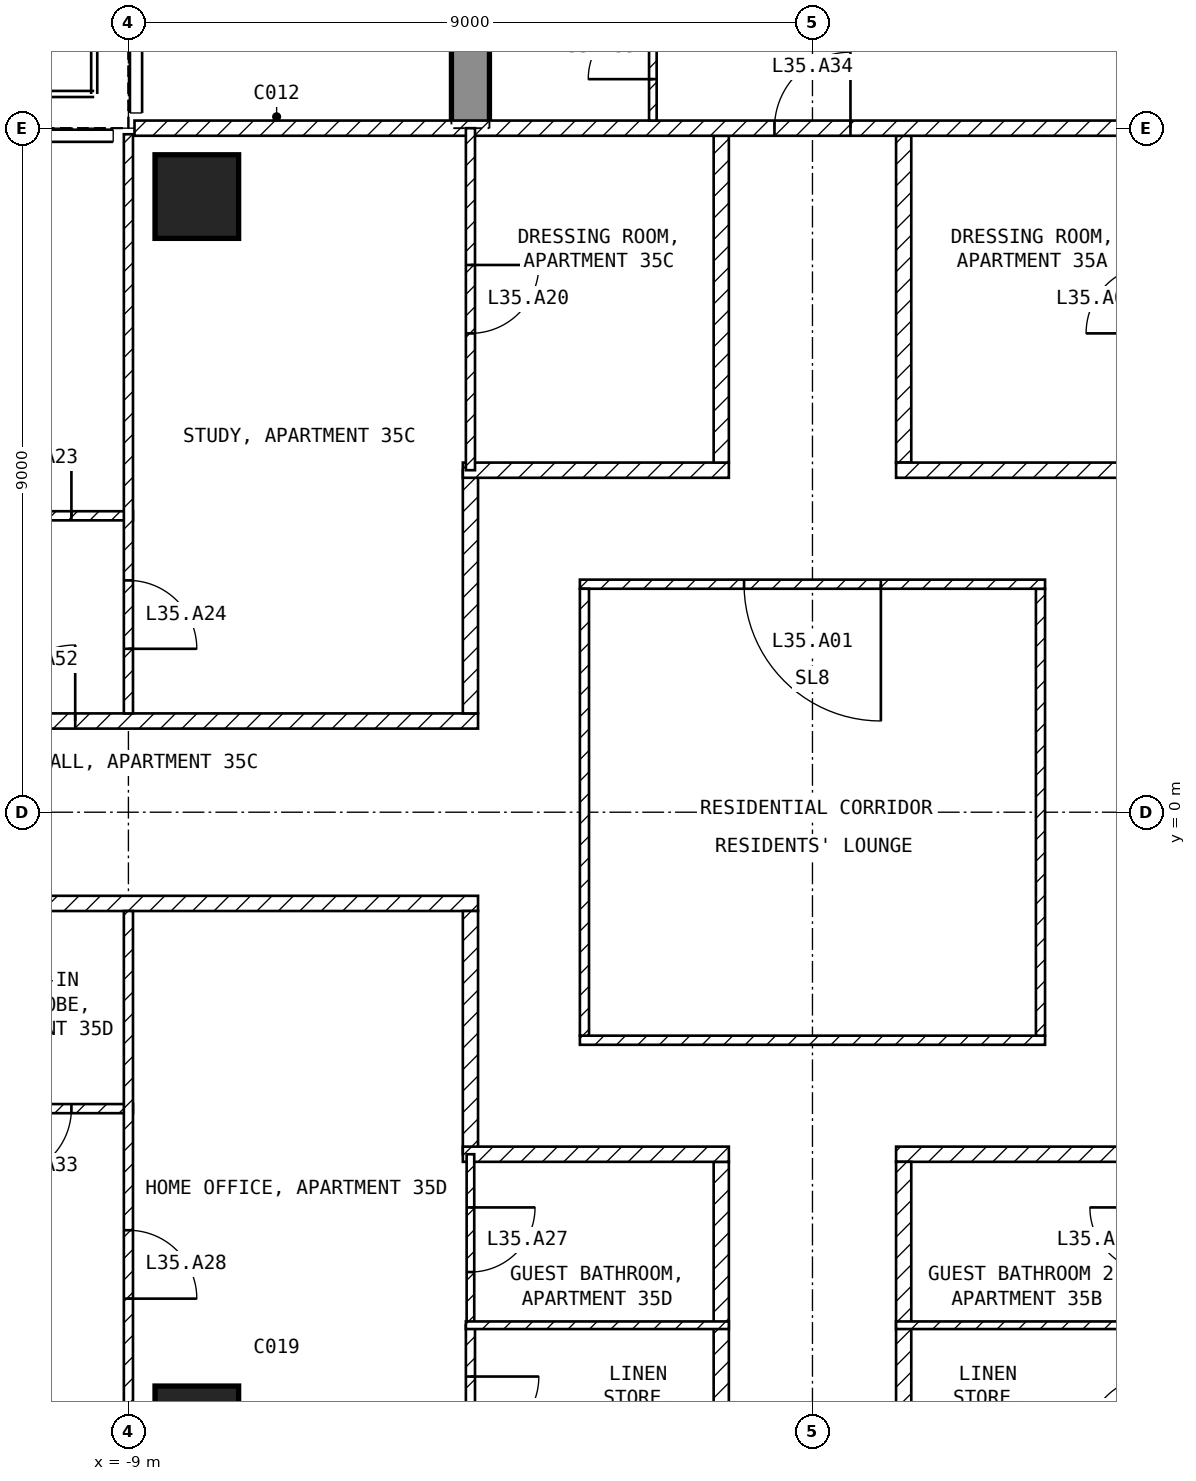
"""IFC4 building model, lengths in metres.
Left out: names, types, materials, properties, quantities, classifications, styles, units other than length and angle.
Written with IfcOpenShell. Run it as: python <this file> out.ifc"""

import sys

from ifc_helpers import new_model, si_unit, direction, frame, frame_2d, origin, origin_2d, place, context, subcontext, project, spatial, polyline, rectangle, outline, extrude, element, fill, save


model = new_model("IFC4")
c1 = context("Model", 3, precision=1e-05, world=origin(), true_north=direction((0.0, 1.0)))
c2 = subcontext(c1, "Body", "Model", "MODEL_VIEW")
j1 = project(units=[si_unit("LENGTHUNIT", "METRE"), si_unit("PLANEANGLEUNIT", "RADIAN")], contexts=[c1])
p1 = place(None, origin())
s1 = spatial("IfcSite", under=j1, at=p1, CompositionType="ELEMENT")
p2 = place(p1, origin())
s2 = spatial("IfcBuilding", under=s1, at=p2, CompositionType="ELEMENT")
p3 = place(p2, frame((0.0, 0.0, 144.4)))
s3 = spatial("IfcBuildingStorey", under=s2, at=p3, CompositionType="ELEMENT", Elevation=144.4)
for number, where, z_axis, x_axis in (
    (1, (-8.1, -8.1, -0.25), (0.0, 0.0, 1.0), (1.0, 0.0, 0.0)),
    (2, (-8.1, 8.1, -0.25), (0.0, 0.0, 1.0), (1.0, 0.0, 0.0)),
):
    element("IfcColumn", number, at=place(p3, frame(where, z_axis=z_axis, x_axis=x_axis)), inside=s3, PredefinedType="COLUMN", context=c2, shape_type="SweptSolid", body=[
        extrude(rectangle(XDim=1.1, YDim=1.1, at=origin_2d()), origin(), (0.0, 0.0, 1.0), 3.5),
    ])
p4 = place(p3, frame((-4.75, 9.0, -0.25), z_axis=(1.0, 0.0, 0.0), x_axis=(0.0, 1.0, 0.0)))
e3 = element("IfcWall", 3, at=p4, inside=s3, PredefinedType="SHEAR", context=c2, shape_type="SweptSolid", body=[
    extrude(outline(polyline([(0.0, 0.0), (2.1, 0.0), (2.1, 2.65), (4.5, 2.65), (4.5, 0.0), (9.9, 0.0), (9.9, 2.65), (12.3, 2.65), (12.3, 0.0), (16.55, 0.0), (16.55, 3.5), (0.0, 3.5), (0.0, 0.0)])), origin(), (0.0, 0.0, 1.0), 0.5),
])
p5 = place(p3, frame((-3.06, -3.0, 0.0), z_axis=(0.0, 0.0, 1.0), x_axis=(1.0, 0.0, 0.0)))
e4 = element("IfcWall", 4, at=p5, inside=s3, PredefinedType="PARTITIONING", context=c2, shape_type="SweptSolid", body=[
    extrude(rectangle(XDim=6.12, YDim=0.12, at=frame_2d((3.06, 0.0))), origin(), (0.0, 0.0, 1.0), 3.25),
])
p6 = place(p3, frame((3.0, -2.94, 0.0), z_axis=(0.0, 0.0, 1.0), x_axis=(0.0, 1.0, 0.0)))
e5 = element("IfcWall", 5, at=p6, inside=s3, PredefinedType="PARTITIONING", context=c2, shape_type="SweptSolid", body=[
    extrude(rectangle(XDim=5.88, YDim=0.12, at=frame_2d((2.94, 0.0))), origin(), (0.0, 0.0, 1.0), 3.25),
])
p7 = place(p3, frame((3.06, 3.0, 0.0), z_axis=(0.0, 0.0, 1.0), x_axis=(-1.0, 0.0, 0.0)))
e6 = element("IfcWall", 6, at=p7, inside=s3, PredefinedType="PARTITIONING", context=c2, shape_type="SweptSolid", body=[
    extrude(rectangle(XDim=6.12, YDim=0.12, at=frame_2d((3.06, 0.0))), origin(), (0.0, 0.0, 1.0), 3.25),
])
p8 = place(p7, frame((2.16, 0.0, 0.0)))
e7 = element("IfcOpeningElement", 7, at=p8, cuts=e6, PredefinedType="OPENING", context=c2, shape_type="SweptSolid", body=[
    extrude(rectangle(XDim=1.8, YDim=2.1, at=frame_2d((0.9, 1.05))), frame((0.0, 0.07, 0.0), z_axis=(0.0, -1.0, 0.0), x_axis=(1.0, 0.0, 0.0)), (0.0, 0.0, 1.0), 0.14),
])
p9 = place(p3, frame((-3.0, 2.94, 0.0), z_axis=(0.0, 0.0, 1.0), x_axis=(0.0, -1.0, 0.0)))
e8 = element("IfcWall", 8, at=p9, inside=s3, PredefinedType="PARTITIONING", context=c2, shape_type="SweptSolid", body=[
    extrude(rectangle(XDim=5.88, YDim=0.12, at=frame_2d((2.94, 0.0))), origin(), (0.0, 0.0, 1.0), 3.25),
])
p10 = place(p3, frame((1.2, 8.9, 0.0), z_axis=(0.0, 0.0, 1.0), x_axis=(0.0, -1.0, 0.0)))
e9 = element("IfcWall", 9, at=p10, inside=s3, PredefinedType="PARTITIONING", context=c2, shape_type="SweptSolid", body=[
    extrude(rectangle(XDim=4.3, YDim=0.2, at=frame_2d((2.15, 0.0))), origin(), (0.0, 0.0, 1.0), 3.25),
])
for number, where, z_axis, x_axis in (
    (10, (1.1, 4.5, 0.0), (0.0, 0.0, 1.0), (1.0, 0.0, 0.0)),
    (11, (4.6, -4.5, 0.0), (0.0, 0.0, 1.0), (-1.0, 0.0, 0.0)),
):
    element("IfcWall", number, at=place(p3, frame(where, z_axis=z_axis, x_axis=x_axis)), inside=s3, PredefinedType="PARTITIONING", context=c2, shape_type="SweptSolid", body=[
        extrude(rectangle(XDim=3.5, YDim=0.2, at=frame_2d((1.75, 0.0))), origin(), (0.0, 0.0, 1.0), 3.25),
    ])
p11 = place(p3, frame((1.2, -4.6, 0.0), z_axis=(0.0, 0.0, 1.0), x_axis=(0.0, -1.0, 0.0)))
e12 = element("IfcWall", 12, at=p11, inside=s3, PredefinedType="PARTITIONING", context=c2, shape_type="SweptSolid", body=[
    extrude(rectangle(XDim=4.3, YDim=0.2, at=frame_2d((2.15, 0.0))), origin(), (0.0, 0.0, 1.0), 3.25),
])
p12 = place(p3, frame((-21.6, 1.2, 0.0), z_axis=(0.0, 0.0, 1.0), x_axis=(1.0, 0.0, 0.0)))
e13 = element("IfcWall", 13, at=p12, inside=s3, PredefinedType="PARTITIONING", context=c2, shape_type="SweptSolid", body=[
    extrude(rectangle(XDim=17.2, YDim=0.2, at=frame_2d((8.6, 0.0))), origin(), (0.0, 0.0, 1.0), 3.25),
])
p13 = place(p12, frame((10.9, 0.0, 0.0)))
e14 = element("IfcOpeningElement", 14, at=p13, cuts=e13, PredefinedType="OPENING", context=c2, shape_type="SweptSolid", body=[
    extrude(rectangle(XDim=1.0, YDim=2.1, at=frame_2d((0.5, 1.05))), frame((0.0, 0.11, 0.0), z_axis=(0.0, -1.0, 0.0), x_axis=(1.0, 0.0, 0.0)), (0.0, 0.0, 1.0), 0.22),
])
p14 = place(p3, frame((-4.5, 1.3, 0.0), z_axis=(0.0, 0.0, 1.0), x_axis=(0.0, 1.0, 0.0)))
e15 = element("IfcWall", 15, at=p14, inside=s3, PredefinedType="PARTITIONING", context=c2, shape_type="SweptSolid", body=[
    extrude(rectangle(XDim=3.2, YDim=0.2, at=frame_2d((1.6, 0.0))), origin(), (0.0, 0.0, 1.0), 3.25),
])
p15 = place(p3, frame((-4.6, 4.5, 0.0), z_axis=(0.0, 0.0, 1.0), x_axis=(1.0, 0.0, 0.0)))
e16 = element("IfcWall", 16, at=p15, inside=s3, PredefinedType="PARTITIONING", context=c2, shape_type="SweptSolid", body=[
    extrude(rectangle(XDim=3.5, YDim=0.2, at=frame_2d((1.75, 0.0))), origin(), (0.0, 0.0, 1.0), 3.25),
])
p16 = place(p3, frame((-1.2, 4.6, 0.0), z_axis=(0.0, 0.0, 1.0), x_axis=(0.0, 1.0, 0.0)))
e17 = element("IfcWall", 17, at=p16, inside=s3, PredefinedType="PARTITIONING", context=c2, shape_type="SweptSolid", body=[
    extrude(rectangle(XDim=4.3, YDim=0.2, at=frame_2d((2.15, 0.0))), origin(), (0.0, 0.0, 1.0), 3.25),
])
p17 = place(p3, frame((-4.4, -1.2, 0.0), z_axis=(0.0, 0.0, 1.0), x_axis=(-1.0, 0.0, 0.0)))
e18 = element("IfcWall", 18, at=p17, inside=s3, PredefinedType="PARTITIONING", context=c2, shape_type="SweptSolid", body=[
    extrude(rectangle(XDim=17.2, YDim=0.2, at=frame_2d((8.6, 0.0))), origin(), (0.0, 0.0, 1.0), 3.25),
])
p18 = place(p17, frame((10.1, 0.0, 0.0)))
e19 = element("IfcOpeningElement", 19, at=p18, cuts=e18, PredefinedType="OPENING", context=c2, shape_type="SweptSolid", body=[
    extrude(rectangle(XDim=1.0, YDim=2.1, at=frame_2d((0.5, 1.05))), frame((0.0, 0.11, 0.0), z_axis=(0.0, -1.0, 0.0), x_axis=(1.0, 0.0, 0.0)), (0.0, 0.0, 1.0), 0.22),
])
p19 = place(p3, frame((-4.5, -4.5, 0.0), z_axis=(0.0, 0.0, 1.0), x_axis=(0.0, 1.0, 0.0)))
e20 = element("IfcWall", 20, at=p19, inside=s3, PredefinedType="PARTITIONING", context=c2, shape_type="SweptSolid", body=[
    extrude(rectangle(XDim=3.2, YDim=0.2, at=frame_2d((1.6, 0.0))), origin(), (0.0, 0.0, 1.0), 3.25),
])
p20 = place(p3, frame((-1.2, -8.9, 0.0), z_axis=(0.0, 0.0, 1.0), x_axis=(0.0, 1.0, 0.0)))
e21 = element("IfcWall", 21, at=p20, inside=s3, PredefinedType="PARTITIONING", context=c2, shape_type="SweptSolid", body=[
    extrude(rectangle(XDim=4.3, YDim=0.2, at=frame_2d((2.15, 0.0))), origin(), (0.0, 0.0, 1.0), 3.25),
])
p21 = place(p3, frame((-1.1, -4.5, 0.0), z_axis=(0.0, 0.0, 1.0), x_axis=(-1.0, 0.0, 0.0)))
e22 = element("IfcWall", 22, at=p21, inside=s3, PredefinedType="PARTITIONING", context=c2, shape_type="SweptSolid", body=[
    extrude(rectangle(XDim=3.5, YDim=0.2, at=frame_2d((1.75, 0.0))), origin(), (0.0, 0.0, 1.0), 3.25),
])
p22 = place(p3, frame((-8.92, 9.0, 0.0), z_axis=(0.0, 0.0, 1.0), x_axis=(1.0, 0.0, 0.0)))
e23 = element("IfcWall", 23, at=p22, inside=s3, PredefinedType="PARTITIONING", context=c2, shape_type="SweptSolid", body=[
    extrude(rectangle(XDim=17.84, YDim=0.2, at=frame_2d((8.92, 0.0))), origin(), (0.0, 0.0, 1.0), 3.25),
])
p23 = place(p22, frame((8.42, 0.0, 0.0)))
e24 = element("IfcOpeningElement", 24, at=p23, cuts=e23, PredefinedType="OPENING", context=c2, shape_type="SweptSolid", body=[
    extrude(rectangle(XDim=1.0, YDim=2.1, at=frame_2d((0.5, 1.05))), frame((0.0, 0.11, 0.0), z_axis=(0.0, -1.0, 0.0), x_axis=(1.0, 0.0, 0.0)), (0.0, 0.0, 1.0), 0.22),
])
p24 = place(p3, frame((4.56, -6.75, 0.0), z_axis=(0.0, 0.0, 1.0), x_axis=(-1.0, 0.0, 0.0)))
e25 = element("IfcWall", 25, at=p24, inside=s3, PredefinedType="PARTITIONING", context=c2, shape_type="SweptSolid", body=[
    extrude(rectangle(XDim=3.46, YDim=0.1, at=frame_2d((1.73, 0.0))), origin(), (0.0, 0.0, 1.0), 3.25),
])
p25 = place(p3, frame((-14.4, 3.9, 0.0), z_axis=(0.0, 0.0, 1.0), x_axis=(1.0, 0.0, 0.0)))
e26 = element("IfcWall", 26, at=p25, inside=s3, PredefinedType="PARTITIONING", context=c2, shape_type="SweptSolid", body=[
    extrude(rectangle(XDim=5.46, YDim=0.12, at=frame_2d((2.73, 0.0))), origin(), (0.0, 0.0, 1.0), 3.25),
])
p26 = place(p25, frame((3.75, 0.0, 0.0)))
e27 = element("IfcOpeningElement", 27, at=p26, cuts=e26, PredefinedType="OPENING", context=c2, shape_type="SweptSolid", body=[
    extrude(rectangle(XDim=0.9, YDim=2.1, at=frame_2d((0.45, 1.05))), frame((0.0, 0.07, 0.0), z_axis=(0.0, -1.0, 0.0), x_axis=(1.0, 0.0, 0.0)), (0.0, 0.0, 1.0), 0.14),
])
p27 = place(p3, frame((-9.0, 8.92, 0.0), z_axis=(0.0, 0.0, 1.0), x_axis=(0.0, -1.0, 0.0)))
e28 = element("IfcWall", 28, at=p27, inside=s3, PredefinedType="PARTITIONING", context=c2, shape_type="SweptSolid", body=[
    extrude(rectangle(XDim=7.62, YDim=0.12, at=frame_2d((3.81, 0.0))), origin(), (0.0, 0.0, 1.0), 3.25),
])
p28 = place(p27, frame((5.87, 0.0, 0.0)))
e29 = element("IfcOpeningElement", 29, at=p28, cuts=e28, PredefinedType="OPENING", context=c2, shape_type="SweptSolid", body=[
    extrude(rectangle(XDim=0.9, YDim=2.1, at=frame_2d((0.45, 1.05))), frame((0.0, 0.07, 0.0), z_axis=(0.0, -1.0, 0.0), x_axis=(1.0, 0.0, 0.0)), (0.0, 0.0, 1.0), 0.14),
])
p29 = place(p3, frame((-4.5, 9.0, 0.0), z_axis=(0.0, 0.0, 1.0), x_axis=(0.0, -1.0, 0.0)))
e30 = element("IfcWall", 30, at=p29, inside=s3, PredefinedType="PARTITIONING", context=c2, shape_type="SweptSolid", body=[
    extrude(rectangle(XDim=4.5, YDim=0.12, at=frame_2d((2.25, 0.0))), origin(), (0.0, 0.0, 1.0), 3.25),
])
p30 = place(p29, frame((1.8, 0.0, 0.0)))
e31 = element("IfcOpeningElement", 31, at=p30, cuts=e30, PredefinedType="OPENING", context=c2, shape_type="SweptSolid", body=[
    extrude(rectangle(XDim=0.9, YDim=2.1, at=frame_2d((0.45, 1.05))), frame((0.0, 0.07, 0.0), z_axis=(0.0, -1.0, 0.0), x_axis=(1.0, 0.0, 0.0)), (0.0, 0.0, 1.0), 0.14),
])
p31 = place(p3, frame((-8.94, -3.9, 0.0), z_axis=(0.0, 0.0, 1.0), x_axis=(-1.0, 0.0, 0.0)))
e32 = element("IfcWall", 32, at=p31, inside=s3, PredefinedType="PARTITIONING", context=c2, shape_type="SweptSolid", body=[
    extrude(rectangle(XDim=2.46, YDim=0.12, at=frame_2d((1.23, 0.0))), origin(), (0.0, 0.0, 1.0), 3.25),
])
p32 = place(p31, frame((0.81, 0.0, 0.0)))
e33 = element("IfcOpeningElement", 33, at=p32, cuts=e32, PredefinedType="OPENING", context=c2, shape_type="SweptSolid", body=[
    extrude(rectangle(XDim=0.9, YDim=2.1, at=frame_2d((0.45, 1.05))), frame((0.0, 0.07, 0.0), z_axis=(0.0, -1.0, 0.0), x_axis=(1.0, 0.0, 0.0)), (0.0, 0.0, 1.0), 0.14),
])
p33 = place(p3, frame((-9.0, -1.3, 0.0), z_axis=(0.0, 0.0, 1.0), x_axis=(0.0, -1.0, 0.0)))
e34 = element("IfcWall", 34, at=p33, inside=s3, PredefinedType="PARTITIONING", context=c2, shape_type="SweptSolid", body=[
    extrude(rectangle(XDim=7.62, YDim=0.12, at=frame_2d((3.81, 0.0))), origin(), (0.0, 0.0, 1.0), 3.25),
])
p34 = place(p33, frame((4.2, 0.0, 0.0)))
e35 = element("IfcOpeningElement", 35, at=p34, cuts=e34, PredefinedType="OPENING", context=c2, shape_type="SweptSolid", body=[
    extrude(rectangle(XDim=0.9, YDim=2.1, at=frame_2d((0.45, 1.05))), frame((0.0, 0.07, 0.0), z_axis=(0.0, -1.0, 0.0), x_axis=(1.0, 0.0, 0.0)), (0.0, 0.0, 1.0), 0.14),
])
p35 = place(p3, frame((-4.5, -4.5, 0.0), z_axis=(0.0, 0.0, 1.0), x_axis=(0.0, -1.0, 0.0)))
e36 = element("IfcWall", 36, at=p35, inside=s3, PredefinedType="PARTITIONING", context=c2, shape_type="SweptSolid", body=[
    extrude(rectangle(XDim=2.25, YDim=0.1, at=frame_2d((1.125, 0.0))), origin(), (0.0, 0.0, 1.0), 3.25),
])
p36 = place(p35, frame((0.7, 0.0, 0.0)))
e37 = element("IfcOpeningElement", 37, at=p36, cuts=e36, PredefinedType="OPENING", context=c2, shape_type="SweptSolid", body=[
    extrude(rectangle(XDim=0.85, YDim=2.1, at=frame_2d((0.425, 1.05))), frame((0.0, 0.06, 0.0), z_axis=(0.0, -1.0, 0.0), x_axis=(1.0, 0.0, 0.0)), (0.0, 0.0, 1.0), 0.12),
])
p37 = place(p3, frame((-4.5, -6.75, 0.0), z_axis=(0.0, 0.0, 1.0), x_axis=(0.0, -1.0, 0.0)))
e38 = element("IfcWall", 38, at=p37, inside=s3, PredefinedType="PARTITIONING", context=c2, shape_type="SweptSolid", body=[
    extrude(rectangle(XDim=2.25, YDim=0.12, at=frame_2d((1.125, 0.0))), origin(), (0.0, 0.0, 1.0), 3.25),
])
p38 = place(p37, frame((0.675, 0.0, 0.0)))
e39 = element("IfcOpeningElement", 39, at=p38, cuts=e38, PredefinedType="OPENING", context=c2, shape_type="SweptSolid", body=[
    extrude(rectangle(XDim=0.9, YDim=2.1, at=frame_2d((0.45, 1.05))), frame((0.0, 0.07, 0.0), z_axis=(0.0, -1.0, 0.0), x_axis=(1.0, 0.0, 0.0)), (0.0, 0.0, 1.0), 0.14),
])
p39 = place(p3, frame((-1.1, -6.75, 0.0), z_axis=(0.0, 0.0, 1.0), x_axis=(-1.0, 0.0, 0.0)))
e40 = element("IfcWall", 40, at=p39, inside=s3, PredefinedType="PARTITIONING", context=c2, shape_type="SweptSolid", body=[
    extrude(rectangle(XDim=3.46, YDim=0.1, at=frame_2d((1.73, 0.0))), origin(), (0.0, 0.0, 1.0), 3.25),
])
p40 = place(p3, frame((-2.1, 9.1, 0.0), z_axis=(0.0, 0.0, 1.0), x_axis=(0.0, 1.0, 0.0)))
e41 = element("IfcWall", 41, at=p40, inside=s3, PredefinedType="PARTITIONING", context=c2, shape_type="SweptSolid", body=[
    extrude(rectangle(XDim=1.94, YDim=0.1, at=frame_2d((0.97, 0.0))), origin(), (0.0, 0.0, 1.0), 3.25),
])
p41 = place(p40, frame((0.545, 0.0, 0.0)))
e42 = element("IfcOpeningElement", 42, at=p41, cuts=e41, PredefinedType="OPENING", context=c2, shape_type="SweptSolid", body=[
    extrude(rectangle(XDim=0.85, YDim=2.1, at=frame_2d((0.425, 1.05))), frame((0.0, 0.06, 0.0), z_axis=(0.0, -1.0, 0.0), x_axis=(1.0, 0.0, 0.0)), (0.0, 0.0, 1.0), 0.12),
])
p42 = place(p8, origin())
e43 = element("IfcDoor", 43, at=p42, inside=s3, OperationType="SINGLE_SWING_LEFT", PredefinedType="DOOR", context=c2, shape_type="SweptSolid", body=[
    extrude(rectangle(XDim=1.8, YDim=2.1, at=frame_2d((0.9, 1.05))), frame((0.0, 0.025, 0.0), z_axis=(0.0, -1.0, 0.0), x_axis=(1.0, 0.0, 0.0)), (0.0, 0.0, 1.0), 0.05),
])
fill(e7, e43)
p43 = place(p30, origin())
e44 = element("IfcDoor", 44, at=p43, inside=s3, OperationType="SINGLE_SWING_LEFT", PredefinedType="DOOR", context=c2, shape_type="SweptSolid", body=[
    extrude(rectangle(XDim=0.9, YDim=2.1, at=frame_2d((0.45, 1.05))), frame((0.0, 0.025, 0.0), z_axis=(0.0, -1.0, 0.0), x_axis=(1.0, 0.0, 0.0)), (0.0, 0.0, 1.0), 0.05),
])
fill(e31, e44)
p44 = place(p26, origin())
e45 = element("IfcDoor", 45, at=p44, inside=s3, OperationType="SINGLE_SWING_RIGHT", PredefinedType="DOOR", context=c2, shape_type="SweptSolid", body=[
    extrude(rectangle(XDim=0.9, YDim=2.1, at=frame_2d((0.45, 1.05))), frame((0.0, 0.025, 0.0), z_axis=(0.0, -1.0, 0.0), x_axis=(1.0, 0.0, 0.0)), (0.0, 0.0, 1.0), 0.05),
])
fill(e27, e45)
p45 = place(p28, origin())
e46 = element("IfcDoor", 46, at=p45, inside=s3, OperationType="SINGLE_SWING_RIGHT", PredefinedType="DOOR", context=c2, shape_type="SweptSolid", body=[
    extrude(rectangle(XDim=0.9, YDim=2.1, at=frame_2d((0.45, 1.05))), frame((0.0, 0.025, 0.0), z_axis=(0.0, -1.0, 0.0), x_axis=(1.0, 0.0, 0.0)), (0.0, 0.0, 1.0), 0.05),
])
fill(e29, e46)
p46 = place(p36, origin())
e47 = element("IfcDoor", 47, at=p46, inside=s3, OperationType="SINGLE_SWING_LEFT", PredefinedType="DOOR", context=c2, shape_type="SweptSolid", body=[
    extrude(rectangle(XDim=0.85, YDim=2.1, at=frame_2d((0.425, 1.05))), frame((0.0, 0.025, 0.0), z_axis=(0.0, -1.0, 0.0), x_axis=(1.0, 0.0, 0.0)), (0.0, 0.0, 1.0), 0.05),
])
fill(e37, e47)
p47 = place(p34, origin())
e48 = element("IfcDoor", 48, at=p47, inside=s3, OperationType="SINGLE_SWING_RIGHT", PredefinedType="DOOR", context=c2, shape_type="SweptSolid", body=[
    extrude(rectangle(XDim=0.9, YDim=2.1, at=frame_2d((0.45, 1.05))), frame((0.0, 0.025, 0.0), z_axis=(0.0, -1.0, 0.0), x_axis=(1.0, 0.0, 0.0)), (0.0, 0.0, 1.0), 0.05),
])
fill(e35, e48)
p48 = place(p38, origin())
e49 = element("IfcDoor", 49, at=p48, inside=s3, OperationType="SINGLE_SWING_LEFT", PredefinedType="DOOR", context=c2, shape_type="SweptSolid", body=[
    extrude(rectangle(XDim=0.9, YDim=2.1, at=frame_2d((0.45, 1.05))), frame((0.0, 0.025, 0.0), z_axis=(0.0, -1.0, 0.0), x_axis=(1.0, 0.0, 0.0)), (0.0, 0.0, 1.0), 0.05),
])
fill(e39, e49)
p49 = place(p32, origin())
e50 = element("IfcDoor", 50, at=p49, inside=s3, OperationType="SINGLE_SWING_RIGHT", PredefinedType="DOOR", context=c2, shape_type="SweptSolid", body=[
    extrude(rectangle(XDim=0.9, YDim=2.1, at=frame_2d((0.45, 1.05))), frame((0.0, 0.025, 0.0), z_axis=(0.0, -1.0, 0.0), x_axis=(1.0, 0.0, 0.0)), (0.0, 0.0, 1.0), 0.05),
])
fill(e33, e50)
p50 = place(p23, origin())
e51 = element("IfcDoor", 51, at=p50, inside=s3, OperationType="SINGLE_SWING_RIGHT", PredefinedType="DOOR", context=c2, shape_type="SweptSolid", body=[
    extrude(rectangle(XDim=1.0, YDim=2.1, at=frame_2d((0.5, 1.05))), frame((0.0, 0.025, 0.0), z_axis=(0.0, -1.0, 0.0), x_axis=(1.0, 0.0, 0.0)), (0.0, 0.0, 1.0), 0.05),
])
fill(e24, e51)
p51 = place(p41, origin())
e52 = element("IfcDoor", 52, at=p51, inside=s3, OperationType="SINGLE_SWING_LEFT", PredefinedType="DOOR", context=c2, shape_type="SweptSolid", body=[
    extrude(rectangle(XDim=0.85, YDim=2.1, at=frame_2d((0.425, 1.05))), frame((0.0, 0.025, 0.0), z_axis=(0.0, -1.0, 0.0), x_axis=(1.0, 0.0, 0.0)), (0.0, 0.0, 1.0), 0.05),
])
fill(e42, e52)
p52 = place(p13, origin())
e53 = element("IfcDoor", 53, at=p52, inside=s3, OperationType="SINGLE_SWING_RIGHT", PredefinedType="DOOR", context=c2, shape_type="SweptSolid", body=[
    extrude(rectangle(XDim=1.0, YDim=2.1, at=frame_2d((0.5, 1.05))), frame((0.0, 0.025, 0.0), z_axis=(0.0, -1.0, 0.0), x_axis=(1.0, 0.0, 0.0)), (0.0, 0.0, 1.0), 0.05),
])
fill(e14, e53)
save(model, sys.argv[1])
